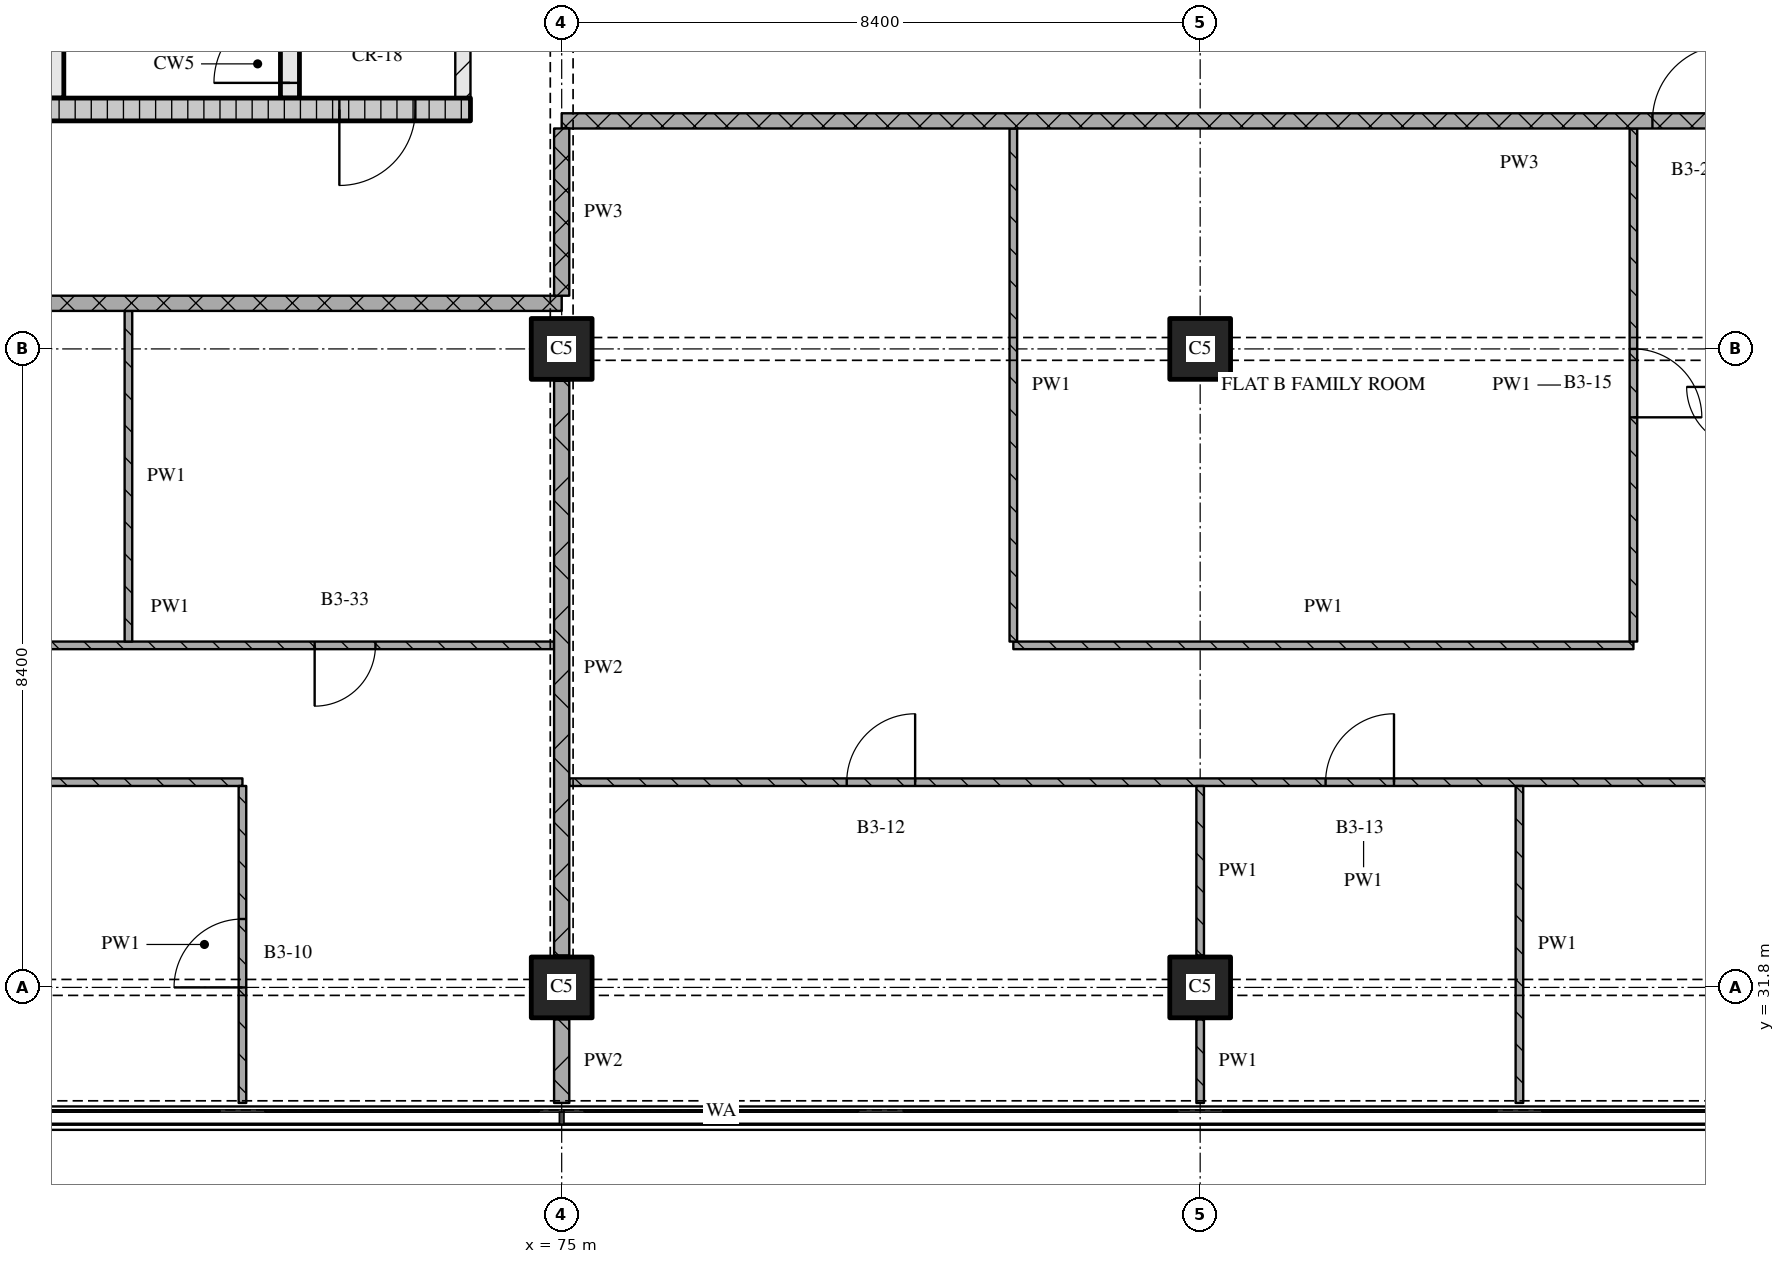
"""IFC4 building model, lengths in metres.
Left out: names, types, materials, properties, quantities, classifications, styles, units other than length and angle.
Written with IfcOpenShell. Run it as: python <this file> out.ifc"""

import sys

from ifc_helpers import new_model, si_unit, direction, frame, frame_2d, origin, origin_2d, place, context, subcontext, project, spatial, rectangle, extrude, element, fill, save


model = new_model("IFC4")
c1 = context("Model", 3, precision=1e-05, world=origin(), true_north=direction((0.0, 1.0)))
c2 = subcontext(c1, "Body", "Model", "MODEL_VIEW")
j1 = project(units=[si_unit("LENGTHUNIT", "METRE"), si_unit("PLANEANGLEUNIT", "RADIAN")], contexts=[c1])
p1 = place(None, origin())
s1 = spatial("IfcSite", under=j1, at=p1, CompositionType="ELEMENT")
p2 = place(p1, origin())
s2 = spatial("IfcBuilding", under=s1, at=p2, CompositionType="ELEMENT")
p3 = place(p2, frame((0.0, 0.0, 116.85)))
s3 = spatial("IfcBuildingStorey", under=s2, at=p3, CompositionType="ELEMENT", Elevation=116.85)
for number, where, z_axis, x_axis in (
    (1, (75.0, 31.8, 0.0), (0.0, 0.0, 1.0), (1.0, 0.0, 0.0)),
    (2, (75.0, 40.2, 0.0), (0.0, 0.0, 1.0), (1.0, 0.0, 0.0)),
    (3, (83.4, 31.8, 0.0), (0.0, 0.0, 1.0), (1.0, 0.0, 0.0)),
    (4, (83.4, 40.2, 0.0), (0.0, 0.0, 1.0), (1.0, 0.0, 0.0)),
):
    element("IfcColumn", number, at=place(p3, frame(where, z_axis=z_axis, x_axis=x_axis)), inside=s3, PredefinedType="COLUMN", context=c2, shape_type="SweptSolid", body=[
        extrude(rectangle(XDim=0.8, YDim=0.8, at=origin_2d()), origin(), (0.0, 0.0, 1.0), 3.6),
    ])
p4 = place(p3, frame((68.2, 43.35, 0.0), z_axis=(0.0, 0.0, 1.0), x_axis=(1.0, 0.0, 0.0)))
e5 = element("IfcWall", 5, at=p4, inside=s3, PredefinedType="SOLIDWALL", context=c2, shape_type="SweptSolid", body=[
    extrude(rectangle(XDim=5.6, YDim=0.3, at=frame_2d((2.8, 0.0))), origin(), (0.0, 0.0, 1.0), 3.32),
])
p5 = place(p4, frame((3.875, 0.0, 0.0)))
e6 = element("IfcOpeningElement", 6, at=p5, cuts=e5, PredefinedType="OPENING", context=c2, shape_type="SweptSolid", body=[
    extrude(rectangle(XDim=1.0, YDim=2.1, at=frame_2d((0.5, 1.05))), frame((0.0, 0.16, 0.0), z_axis=(0.0, -1.0, 0.0), x_axis=(1.0, 0.0, 0.0)), (0.0, 0.0, 1.0), 0.32),
])
p6 = place(p3, frame((68.325, 43.5, 0.0), z_axis=(0.0, 0.0, 1.0), x_axis=(0.0, 1.0, 0.0)))
e7 = element("IfcWall", 7, at=p6, inside=s3, PredefinedType="SOLIDWALL", context=c2, shape_type="SweptSolid", body=[
    extrude(rectangle(XDim=6.9, YDim=0.25, at=frame_2d((3.45, 0.0))), origin(), (0.0, 0.0, 1.0), 3.32),
])
p7 = place(p3, frame((71.425, 43.5, 0.0), z_axis=(0.0, 0.0, 1.0), x_axis=(0.0, 1.0, 0.0)))
e8 = element("IfcWall", 8, at=p7, inside=s3, PredefinedType="SOLIDWALL", context=c2, shape_type="SweptSolid", body=[
    extrude(rectangle(XDim=6.9, YDim=0.25, at=frame_2d((3.45, 0.0))), origin(), (0.0, 0.0, 1.0), 3.32),
])
p8 = place(p7, frame((0.2, 0.0, 0.0)))
e9 = element("IfcOpeningElement", 9, at=p8, cuts=e8, PredefinedType="OPENING", context=c2, shape_type="SweptSolid", body=[
    extrude(rectangle(XDim=1.0, YDim=2.1, at=frame_2d((0.5, 1.05))), frame((0.0, 0.135, 0.0), z_axis=(0.0, -1.0, 0.0), x_axis=(1.0, 0.0, 0.0)), (0.0, 0.0, 1.0), 0.27),
])
p9 = place(p3, frame((73.7, 43.5, 0.0), z_axis=(0.0, 0.0, 1.0), x_axis=(0.0, 1.0, 0.0)))
e10 = element("IfcWall", 10, at=p9, inside=s3, PredefinedType="PARTITIONING", context=c2, shape_type="SweptSolid", body=[
    extrude(rectangle(XDim=6.9, YDim=0.2, at=frame_2d((3.45, 0.0))), origin(), (0.0, 0.0, 1.0), 3.32),
])
p10 = place(p9, frame((1.0, 0.0, 0.0)))
e11 = element("IfcOpeningElement", 11, at=p10, cuts=e10, PredefinedType="OPENING", context=c2, shape_type="SweptSolid", body=[
    extrude(rectangle(XDim=1.0, YDim=2.1, at=frame_2d((0.5, 1.05))), frame((0.0, 0.11, 0.0), z_axis=(0.0, -1.0, 0.0), x_axis=(1.0, 0.0, 0.0)), (0.0, 0.0, 1.0), 0.22),
])
p11 = place(p3, frame((70.8, 34.5, 0.0), z_axis=(0.0, 0.0, 1.0), x_axis=(-1.0, 0.0, 0.0)))
e12 = element("IfcWall", 12, at=p11, inside=s3, PredefinedType="PARTITIONING", context=c2, shape_type="SweptSolid", body=[
    extrude(rectangle(XDim=22.52, YDim=0.1, at=frame_2d((11.26, 0.0))), origin(), (0.0, 0.0, 1.0), 3.32),
])
p12 = place(p11, frame((12.15, 0.0, 0.0)))
e13 = element("IfcOpeningElement", 13, at=p12, cuts=e12, PredefinedType="OPENING", context=c2, shape_type="SweptSolid", body=[
    extrude(rectangle(XDim=0.9, YDim=2.1, at=frame_2d((0.45, 1.05))), frame((0.0, 0.06, 0.0), z_axis=(0.0, -1.0, 0.0), x_axis=(1.0, 0.0, 0.0)), (0.0, 0.0, 1.0), 0.12),
])
p13 = place(p11, frame((17.654, 0.0, 0.0)))
e14 = element("IfcOpeningElement", 14, at=p13, cuts=e12, PredefinedType="OPENING", context=c2, shape_type="SweptSolid", body=[
    extrude(rectangle(XDim=0.9, YDim=2.1, at=frame_2d((0.45, 1.05))), frame((0.0, 0.06, 0.0), z_axis=(0.0, -1.0, 0.0), x_axis=(1.0, 0.0, 0.0)), (0.0, 0.0, 1.0), 0.12),
])
p14 = place(p3, frame((96.0, 34.5, 0.0), z_axis=(0.0, 0.0, 1.0), x_axis=(-1.0, 0.0, 0.0)))
e15 = element("IfcWall", 15, at=p14, inside=s3, PredefinedType="PARTITIONING", context=c2, shape_type="SweptSolid", body=[
    extrude(rectangle(XDim=20.9, YDim=0.1, at=frame_2d((10.45, 0.0))), origin(), (0.0, 0.0, 1.0), 3.32),
])
p15 = place(p14, frame((10.05, 0.0, 0.0)))
e16 = element("IfcOpeningElement", 16, at=p15, cuts=e15, PredefinedType="OPENING", context=c2, shape_type="SweptSolid", body=[
    extrude(rectangle(XDim=0.9, YDim=2.1, at=frame_2d((0.45, 1.05))), frame((0.0, 0.06, 0.0), z_axis=(0.0, -1.0, 0.0), x_axis=(1.0, 0.0, 0.0)), (0.0, 0.0, 1.0), 0.12),
])
p16 = place(p14, frame((16.35, 0.0, 0.0)))
e17 = element("IfcOpeningElement", 17, at=p16, cuts=e15, PredefinedType="OPENING", context=c2, shape_type="SweptSolid", body=[
    extrude(rectangle(XDim=0.9, YDim=2.1, at=frame_2d((0.45, 1.05))), frame((0.0, 0.06, 0.0), z_axis=(0.0, -1.0, 0.0), x_axis=(1.0, 0.0, 0.0)), (0.0, 0.0, 1.0), 0.12),
])
p17 = place(p3, frame((64.8, 36.3, 0.0), z_axis=(0.0, 0.0, 1.0), x_axis=(1.0, 0.0, 0.0)))
e18 = element("IfcWall", 18, at=p17, inside=s3, PredefinedType="PARTITIONING", context=c2, shape_type="SweptSolid", body=[
    extrude(rectangle(XDim=10.1, YDim=0.1, at=frame_2d((5.05, 0.0))), origin(), (0.0, 0.0, 1.0), 3.32),
])
p18 = place(p17, frame((6.95, 0.0, 0.0)))
e19 = element("IfcOpeningElement", 19, at=p18, cuts=e18, PredefinedType="OPENING", context=c2, shape_type="SweptSolid", body=[
    extrude(rectangle(XDim=0.8, YDim=2.1, at=frame_2d((0.4, 1.05))), frame((0.0, 0.06, 0.0), z_axis=(0.0, -1.0, 0.0), x_axis=(1.0, 0.0, 0.0)), (0.0, 0.0, 1.0), 0.12),
])
p19 = place(p3, frame((80.942, 36.3, 0.0), z_axis=(0.0, 0.0, 1.0), x_axis=(1.0, 0.0, 0.0)))
e20 = element("IfcWall", 20, at=p19, inside=s3, PredefinedType="PARTITIONING", context=c2, shape_type="SweptSolid", body=[
    extrude(rectangle(XDim=8.158, YDim=0.1, at=frame_2d((4.079, 0.0))), origin(), (0.0, 0.0, 1.0), 3.32),
])
p20 = place(p3, frame((75.0, 40.8, 0.0), z_axis=(0.0, 0.0, 1.0), x_axis=(-1.0, 0.0, 0.0)))
e21 = element("IfcWall", 21, at=p20, inside=s3, PredefinedType="PARTITIONING", context=c2, shape_type="SweptSolid", body=[
    extrude(rectangle(XDim=24.18, YDim=0.2, at=frame_2d((12.09, 0.0))), origin(), (0.0, 0.0, 1.0), 3.32),
])
p21 = place(p20, frame((10.45, 0.0, 0.0)))
e22 = element("IfcOpeningElement", 22, at=p21, cuts=e21, PredefinedType="OPENING", context=c2, shape_type="SweptSolid", body=[
    extrude(rectangle(XDim=1.0, YDim=2.1, at=frame_2d((0.5, 1.05))), frame((0.0, 0.11, 0.0), z_axis=(0.0, -1.0, 0.0), x_axis=(1.0, 0.0, 0.0)), (0.0, 0.0, 1.0), 0.22),
])
p22 = place(p3, frame((100.2, 43.2, 0.0), z_axis=(0.0, 0.0, 1.0), x_axis=(-1.0, 0.0, 0.0)))
e23 = element("IfcWall", 23, at=p22, inside=s3, PredefinedType="PARTITIONING", context=c2, shape_type="SweptSolid", body=[
    extrude(rectangle(XDim=25.2, YDim=0.2, at=frame_2d((12.6, 0.0))), origin(), (0.0, 0.0, 1.0), 3.32),
])
p23 = place(p22, frame((9.85, 0.0, 0.0)))
e24 = element("IfcOpeningElement", 24, at=p23, cuts=e23, PredefinedType="OPENING", context=c2, shape_type="SweptSolid", body=[
    extrude(rectangle(XDim=1.0, YDim=2.1, at=frame_2d((0.5, 1.05))), frame((0.0, 0.11, 0.0), z_axis=(0.0, -1.0, 0.0), x_axis=(1.0, 0.0, 0.0)), (0.0, 0.0, 1.0), 0.22),
])
p24 = place(p3, frame((69.3, 40.7, 0.0), z_axis=(0.0, 0.0, 1.0), x_axis=(0.0, -1.0, 0.0)))
e25 = element("IfcWall", 25, at=p24, inside=s3, PredefinedType="PARTITIONING", context=c2, shape_type="SweptSolid", body=[
    extrude(rectangle(XDim=4.35, YDim=0.1, at=frame_2d((2.175, 0.0))), origin(), (0.0, 0.0, 1.0), 3.32),
])
p25 = place(p3, frame((70.8, 30.28, 0.0), z_axis=(0.0, 0.0, 1.0), x_axis=(0.0, 1.0, 0.0)))
e26 = element("IfcWall", 26, at=p25, inside=s3, PredefinedType="PARTITIONING", context=c2, shape_type="SweptSolid", body=[
    extrude(rectangle(XDim=4.17, YDim=0.1, at=frame_2d((2.085, 0.0))), origin(), (0.0, 0.0, 1.0), 3.32),
])
p26 = place(p25, frame((1.52, 0.0, 0.0)))
e27 = element("IfcOpeningElement", 27, at=p26, cuts=e26, PredefinedType="OPENING", context=c2, shape_type="SweptSolid", body=[
    extrude(rectangle(XDim=0.9, YDim=2.1, at=frame_2d((0.45, 1.05))), frame((0.0, 0.06, 0.0), z_axis=(0.0, -1.0, 0.0), x_axis=(1.0, 0.0, 0.0)), (0.0, 0.0, 1.0), 0.12),
])
p27 = place(p3, frame((75.0, 43.1, 0.0), z_axis=(0.0, 0.0, 1.0), x_axis=(0.0, -1.0, 0.0)))
e28 = element("IfcWall", 28, at=p27, inside=s3, PredefinedType="PARTITIONING", context=c2, shape_type="SweptSolid", body=[
    extrude(rectangle(XDim=2.2, YDim=0.2, at=frame_2d((1.1, 0.0))), origin(), (0.0, 0.0, 1.0), 2.43),
])
p28 = place(p3, frame((75.0, 31.38, 0.0), z_axis=(0.0, 0.0, 1.0), x_axis=(0.0, -1.0, 0.0)))
e29 = element("IfcWall", 29, at=p28, inside=s3, PredefinedType="PARTITIONING", context=c2, shape_type="SweptSolid", body=[
    extrude(rectangle(XDim=1.1, YDim=0.2, at=frame_2d((0.55, 0.0))), origin(), (0.0, 0.0, 1.0), 3.32),
])
p29 = place(p3, frame((75.0, 39.78, 0.0), z_axis=(0.0, 0.0, 1.0), x_axis=(0.0, -1.0, 0.0)))
e30 = element("IfcWall", 30, at=p29, inside=s3, PredefinedType="PARTITIONING", context=c2, shape_type="SweptSolid", body=[
    extrude(rectangle(XDim=7.56, YDim=0.2, at=frame_2d((3.78, 0.0))), origin(), (0.0, 0.0, 1.0), 2.83),
])
p30 = place(p3, frame((80.942, 43.1, 0.0), z_axis=(0.0, 0.0, 1.0), x_axis=(0.0, -1.0, 0.0)))
e31 = element("IfcWall", 31, at=p30, inside=s3, PredefinedType="PARTITIONING", context=c2, shape_type="SweptSolid", body=[
    extrude(rectangle(XDim=6.75, YDim=0.1, at=frame_2d((3.375, 0.0))), origin(), (0.0, 0.0, 1.0), 3.32),
])
p31 = place(p3, frame((83.4, 31.38, 0.0), z_axis=(0.0, 0.0, 1.0), x_axis=(0.0, -1.0, 0.0)))
e32 = element("IfcWall", 32, at=p31, inside=s3, PredefinedType="PARTITIONING", context=c2, shape_type="SweptSolid", body=[
    extrude(rectangle(XDim=1.1, YDim=0.1, at=frame_2d((0.55, 0.0))), origin(), (0.0, 0.0, 1.0), 3.32),
])
p32 = place(p3, frame((83.4, 34.45, 0.0), z_axis=(0.0, 0.0, 1.0), x_axis=(0.0, -1.0, 0.0)))
e33 = element("IfcWall", 33, at=p32, inside=s3, PredefinedType="PARTITIONING", context=c2, shape_type="SweptSolid", body=[
    extrude(rectangle(XDim=2.23, YDim=0.1, at=frame_2d((1.115, 0.0))), origin(), (0.0, 0.0, 1.0), 3.32),
])
p33 = place(p3, frame((87.6, 34.45, 0.0), z_axis=(0.0, 0.0, 1.0), x_axis=(0.0, -1.0, 0.0)))
e34 = element("IfcWall", 34, at=p33, inside=s3, PredefinedType="PARTITIONING", context=c2, shape_type="SweptSolid", body=[
    extrude(rectangle(XDim=4.17, YDim=0.1, at=frame_2d((2.085, 0.0))), origin(), (0.0, 0.0, 1.0), 3.32),
])
p34 = place(p3, frame((89.1, 36.35, 0.0), z_axis=(0.0, 0.0, 1.0), x_axis=(0.0, 1.0, 0.0)))
e35 = element("IfcWall", 35, at=p34, inside=s3, PredefinedType="PARTITIONING", context=c2, shape_type="SweptSolid", body=[
    extrude(rectangle(XDim=6.75, YDim=0.1, at=frame_2d((3.375, 0.0))), origin(), (0.0, 0.0, 1.0), 3.32),
])
p35 = place(p34, frame((2.95, 0.0, 0.0)))
e36 = element("IfcOpeningElement", 36, at=p35, cuts=e35, PredefinedType="OPENING", context=c2, shape_type="SweptSolid", body=[
    extrude(rectangle(XDim=0.9, YDim=2.1, at=frame_2d((0.45, 1.05))), frame((0.0, 0.06, 0.0), z_axis=(0.0, -1.0, 0.0), x_axis=(1.0, 0.0, 0.0)), (0.0, 0.0, 1.0), 0.12),
])
p36 = place(p5, origin())
e37 = element("IfcDoor", 37, at=p36, inside=s3, OperationType="SINGLE_SWING_RIGHT", PredefinedType="DOOR", context=c2, shape_type="SweptSolid", body=[
    extrude(rectangle(XDim=1.0, YDim=2.1, at=frame_2d((0.5, 1.05))), frame((0.0, 0.025, 0.0), z_axis=(0.0, -1.0, 0.0), x_axis=(1.0, 0.0, 0.0)), (0.0, 0.0, 1.0), 0.05),
])
fill(e6, e37)
p37 = place(p8, origin())
e38 = element("IfcDoor", 38, at=p37, inside=s3, OperationType="SINGLE_SWING_LEFT", PredefinedType="DOOR", context=c2, shape_type="SweptSolid", body=[
    extrude(rectangle(XDim=1.0, YDim=2.1, at=frame_2d((0.5, 1.05))), frame((0.0, 0.025, 0.0), z_axis=(0.0, -1.0, 0.0), x_axis=(1.0, 0.0, 0.0)), (0.0, 0.0, 1.0), 0.05),
])
fill(e9, e38)
p38 = place(p15, origin())
e39 = element("IfcDoor", 39, at=p38, inside=s3, OperationType="SINGLE_SWING_RIGHT", PredefinedType="DOOR", context=c2, shape_type="SweptSolid", body=[
    extrude(rectangle(XDim=0.9, YDim=2.1, at=frame_2d((0.45, 1.05))), frame((0.0, 0.025, 0.0), z_axis=(0.0, -1.0, 0.0), x_axis=(1.0, 0.0, 0.0)), (0.0, 0.0, 1.0), 0.05),
])
fill(e16, e39)
p39 = place(p16, origin())
e40 = element("IfcDoor", 40, at=p39, inside=s3, OperationType="SINGLE_SWING_RIGHT", PredefinedType="DOOR", context=c2, shape_type="SweptSolid", body=[
    extrude(rectangle(XDim=0.9, YDim=2.1, at=frame_2d((0.45, 1.05))), frame((0.0, 0.025, 0.0), z_axis=(0.0, -1.0, 0.0), x_axis=(1.0, 0.0, 0.0)), (0.0, 0.0, 1.0), 0.05),
])
fill(e17, e40)
p40 = place(p18, origin())
e41 = element("IfcDoor", 41, at=p40, inside=s3, OperationType="SINGLE_SWING_RIGHT", PredefinedType="DOOR", context=c2, shape_type="SweptSolid", body=[
    extrude(rectangle(XDim=0.8, YDim=2.1, at=frame_2d((0.4, 1.05))), frame((0.0, 0.025, 0.0), z_axis=(0.0, -1.0, 0.0), x_axis=(1.0, 0.0, 0.0)), (0.0, 0.0, 1.0), 0.05),
])
fill(e19, e41)
p41 = place(p23, origin())
e42 = element("IfcDoor", 42, at=p41, inside=s3, OperationType="SINGLE_SWING_RIGHT", PredefinedType="DOOR", context=c2, shape_type="SweptSolid", body=[
    extrude(rectangle(XDim=1.0, YDim=2.1, at=frame_2d((0.5, 1.05))), frame((0.0, 0.025, 0.0), z_axis=(0.0, -1.0, 0.0), x_axis=(1.0, 0.0, 0.0)), (0.0, 0.0, 1.0), 0.05),
])
fill(e24, e42)
p42 = place(p26, origin())
e43 = element("IfcDoor", 43, at=p42, inside=s3, OperationType="SINGLE_SWING_LEFT", PredefinedType="DOOR", context=c2, shape_type="SweptSolid", body=[
    extrude(rectangle(XDim=0.9, YDim=2.1, at=frame_2d((0.45, 1.05))), frame((0.0, 0.025, 0.0), z_axis=(0.0, -1.0, 0.0), x_axis=(1.0, 0.0, 0.0)), (0.0, 0.0, 1.0), 0.05),
])
fill(e27, e43)
p43 = place(p35, origin())
e44 = element("IfcDoor", 44, at=p43, inside=s3, OperationType="SINGLE_SWING_RIGHT", PredefinedType="DOOR", context=c2, shape_type="SweptSolid", body=[
    extrude(rectangle(XDim=0.9, YDim=2.1, at=frame_2d((0.45, 1.05))), frame((0.0, 0.025, 0.0), z_axis=(0.0, -1.0, 0.0), x_axis=(1.0, 0.0, 0.0)), (0.0, 0.0, 1.0), 0.05),
])
fill(e36, e44)
save(model, sys.argv[1])
